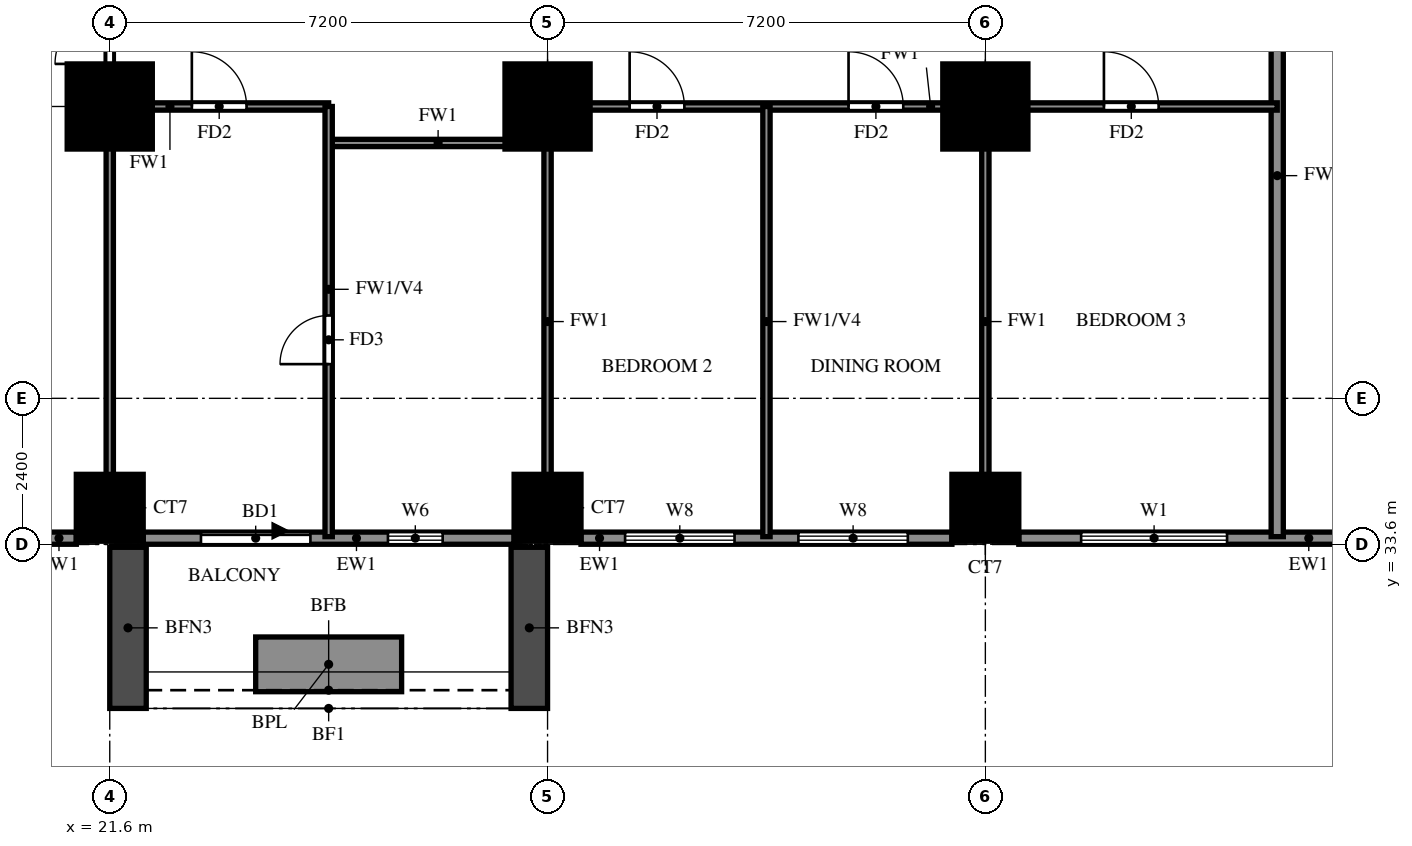
"""IFC4 building model, lengths in metres.
Left out: names, types, materials, properties, quantities, classifications, styles, units other than length and angle.
Written with IfcOpenShell. Run it as: python <this file> out.ifc"""

import sys

from ifc_helpers import new_model, si_unit, direction, frame, frame_2d, origin, origin_2d, place, context, subcontext, project, spatial, rectangle, extrude, source, transform, mapped, element, fill, save


model = new_model("IFC4")
c1 = context("Model", 3, precision=1e-05, world=origin(), true_north=direction((0.0, 1.0)))
c2 = subcontext(c1, "Body", "Model", "MODEL_VIEW")
j1 = project(units=[si_unit("LENGTHUNIT", "METRE"), si_unit("PLANEANGLEUNIT", "RADIAN")], contexts=[c1])
p1 = place(None, origin())
s1 = spatial("IfcSite", under=j1, at=p1, CompositionType="ELEMENT")
p2 = place(p1, origin())
s2 = spatial("IfcBuilding", under=s1, at=p2, CompositionType="ELEMENT")
p3 = place(p2, frame((0.0, 0.0, 44.5)))
s3 = spatial("IfcBuildingStorey", under=s2, at=p3, CompositionType="ELEMENT", Elevation=44.5)
m1 = source(origin(), c2, "Body", "SweptSolid", [
    extrude(rectangle(XDim=1.1, YDim=1.1, at=origin_2d()), origin(), (0.0, 0.0, 1.0), 3.18),
])
for number, where, z_axis, x_axis in (
    (1, (21.6, 34.2, 0.0), (0.0, 0.0, 1.0), (1.0, 0.0, 0.0)),
    (2, (28.8, 34.2, 0.0), (0.0, 0.0, 1.0), (1.0, 0.0, 0.0)),
    (3, (36.0, 34.2, 0.0), (0.0, 0.0, 1.0), (1.0, 0.0, 0.0)),
):
    element("IfcColumn", number, at=place(p3, frame(where, z_axis=z_axis, x_axis=x_axis)), inside=s3, PredefinedType="COLUMN", context=c2, shape_type="MappedRepresentation", body=[
        mapped(m1, transform((0.0, 0.0, 0.0))),
    ])
m2 = source(origin(), c2, "Body", "SweptSolid", [
    extrude(rectangle(XDim=1.4, YDim=1.4, at=origin_2d()), origin(), (0.0, 0.0, 1.0), 3.18),
])
for number, where, z_axis, x_axis in (
    (4, (21.6, 40.8, 0.0), (0.0, 0.0, 1.0), (1.0, 0.0, 0.0)),
    (5, (28.8, 40.8, 0.0), (0.0, 0.0, 1.0), (1.0, 0.0, 0.0)),
    (6, (36.0, 40.8, 0.0), (0.0, 0.0, 1.0), (1.0, 0.0, 0.0)),
):
    element("IfcColumn", number, at=place(p3, frame(where, z_axis=z_axis, x_axis=x_axis)), inside=s3, PredefinedType="COLUMN", context=c2, shape_type="MappedRepresentation", body=[
        mapped(m2, transform((0.0, 0.0, 0.0))),
    ])
p4 = place(p3, frame((18.2, 33.7, 0.0), z_axis=(0.0, 0.0, 1.0), x_axis=(1.0, 0.0, 0.0)))
e7 = element("IfcWall", 7, at=p4, inside=s3, PredefinedType="SOLIDWALL", context=c2, shape_type="SweptSolid", body=[
    extrude(rectangle(XDim=2.85, YDim=0.2, at=frame_2d((1.425, 0.0))), origin(), (0.0, 0.0, 1.0), 3.18),
])
p5 = place(p4, frame((0.525, 0.0, 0.6)))
e8 = element("IfcOpeningElement", 8, at=p5, cuts=e7, PredefinedType="OPENING", context=c2, shape_type="SweptSolid", body=[
    extrude(rectangle(XDim=1.8, YDim=2.4, at=frame_2d((0.9, 1.2))), frame((0.0, 0.11, 0.0), z_axis=(0.0, -1.0, 0.0), x_axis=(1.0, 0.0, 0.0)), (0.0, 0.0, 1.0), 0.22),
])
p6 = place(p3, frame((22.15, 33.7, 0.0), z_axis=(0.0, 0.0, 1.0), x_axis=(1.0, 0.0, 0.0)))
e9 = element("IfcWall", 9, at=p6, inside=s3, PredefinedType="SOLIDWALL", context=c2, shape_type="SweptSolid", body=[
    extrude(rectangle(XDim=6.1, YDim=0.2, at=frame_2d((3.05, 0.0))), origin(), (0.0, 0.0, 1.0), 3.18),
])
p7 = place(p6, frame((0.95, 0.0, 0.0)))
e10 = element("IfcOpeningElement", 10, at=p7, cuts=e9, PredefinedType="OPENING", context=c2, shape_type="SweptSolid", body=[
    extrude(rectangle(XDim=1.8, YDim=2.4, at=frame_2d((0.9, 1.2))), frame((0.0, 0.11, 0.0), z_axis=(0.0, -1.0, 0.0), x_axis=(1.0, 0.0, 0.0)), (0.0, 0.0, 1.0), 0.22),
])
p8 = place(p6, frame((4.025, 0.0, 1.5)))
e11 = element("IfcOpeningElement", 11, at=p8, cuts=e9, PredefinedType="OPENING", context=c2, shape_type="SweptSolid", body=[
    extrude(rectangle(XDim=0.9, YDim=0.9, at=frame_2d((0.45, 0.45))), frame((0.0, 0.11, 0.0), z_axis=(0.0, -1.0, 0.0), x_axis=(1.0, 0.0, 0.0)), (0.0, 0.0, 1.0), 0.22),
])
p9 = place(p3, frame((29.35, 33.7, 0.0), z_axis=(0.0, 0.0, 1.0), x_axis=(1.0, 0.0, 0.0)))
e12 = element("IfcWall", 12, at=p9, inside=s3, PredefinedType="SOLIDWALL", context=c2, shape_type="SweptSolid", body=[
    extrude(rectangle(XDim=6.1, YDim=0.2, at=frame_2d((3.05, 0.0))), origin(), (0.0, 0.0, 1.0), 3.18),
])
p10 = place(p9, frame((0.725, 0.0, 0.6)))
e13 = element("IfcOpeningElement", 13, at=p10, cuts=e12, PredefinedType="OPENING", context=c2, shape_type="SweptSolid", body=[
    extrude(rectangle(XDim=1.8, YDim=2.4, at=frame_2d((0.9, 1.2))), frame((0.0, 0.11, 0.0), z_axis=(0.0, -1.0, 0.0), x_axis=(1.0, 0.0, 0.0)), (0.0, 0.0, 1.0), 0.22),
])
p11 = place(p9, frame((3.575, 0.0, 0.6)))
e14 = element("IfcOpeningElement", 14, at=p11, cuts=e12, PredefinedType="OPENING", context=c2, shape_type="SweptSolid", body=[
    extrude(rectangle(XDim=1.8, YDim=2.4, at=frame_2d((0.9, 1.2))), frame((0.0, 0.11, 0.0), z_axis=(0.0, -1.0, 0.0), x_axis=(1.0, 0.0, 0.0)), (0.0, 0.0, 1.0), 0.22),
])
p12 = place(p3, frame((36.55, 33.7, 0.0), z_axis=(0.0, 0.0, 1.0), x_axis=(1.0, 0.0, 0.0)))
e15 = element("IfcWall", 15, at=p12, inside=s3, PredefinedType="SOLIDWALL", context=c2, shape_type="SweptSolid", body=[
    extrude(rectangle(XDim=5.45, YDim=0.2, at=frame_2d((2.725, 0.0))), origin(), (0.0, 0.0, 1.0), 3.18),
])
p13 = place(p12, frame((1.025, 0.0, 0.6)))
e16 = element("IfcOpeningElement", 16, at=p13, cuts=e15, PredefinedType="OPENING", context=c2, shape_type="SweptSolid", body=[
    extrude(rectangle(XDim=2.4, YDim=2.4, at=frame_2d((1.2, 1.2))), frame((0.0, 0.11, 0.0), z_axis=(0.0, -1.0, 0.0), x_axis=(1.0, 0.0, 0.0)), (0.0, 0.0, 1.0), 0.22),
])
for number, where, z_axis, x_axis in (
    (17, (21.9, 33.55, 0.0), (0.0, 0.0, 1.0), (0.0, -1.0, 0.0)),
    (18, (28.5, 33.55, 0.0), (0.0, 0.0, 1.0), (0.0, -1.0, 0.0)),
):
    element("IfcWall", number, at=place(p3, frame(where, z_axis=z_axis, x_axis=x_axis)), inside=s3, PredefinedType="SOLIDWALL", context=c2, shape_type="SweptSolid", body=[
        extrude(rectangle(XDim=2.65, YDim=0.6, at=frame_2d((1.325, 0.0))), origin(), (0.0, 0.0, 1.0), 2.85),
    ])
p14 = place(p3, frame((24.0, 31.625, 0.0), z_axis=(0.0, 0.0, 1.0), x_axis=(1.0, 0.0, 0.0)))
e19 = element("IfcWall", 19, at=p14, inside=s3, PredefinedType="SOLIDWALL", context=c2, shape_type="SweptSolid", body=[
    extrude(rectangle(XDim=2.4, YDim=0.9, at=frame_2d((1.2, 0.0))), origin(), (0.0, 0.0, 1.0), 0.9),
])
p15 = place(p3, frame((40.8, 33.725, 0.0), z_axis=(0.0, 0.0, 1.0), x_axis=(0.0, 1.0, 0.0)))
e20 = element("IfcWall", 20, at=p15, inside=s3, PredefinedType="SOLIDWALL", context=c2, shape_type="SweptSolid", body=[
    extrude(rectangle(XDim=11.875, YDim=0.2, at=frame_2d((5.938, 0.0))), origin(), (0.0, 0.0, 1.0), 2.28),
])
p16 = place(p3, frame((25.2, 40.2, 0.0), z_axis=(0.0, 0.0, 1.0), x_axis=(1.0, 0.0, 0.0)))
e21 = element("IfcWall", 21, at=p16, inside=s3, PredefinedType="PARTITIONING", context=c2, shape_type="SweptSolid", body=[
    extrude(rectangle(XDim=3.6, YDim=0.12, at=frame_2d((1.8, 0.0))), origin(), (0.0, 0.0, 1.0), 3.18),
])
p17 = place(p3, frame((21.6, 40.8, 0.0), z_axis=(0.0, 0.0, 1.0), x_axis=(1.0, 0.0, 0.0)))
e22 = element("IfcWall", 22, at=p17, inside=s3, PredefinedType="PARTITIONING", context=c2, shape_type="SweptSolid", body=[
    extrude(rectangle(XDim=3.6, YDim=0.12, at=frame_2d((1.8, 0.0))), origin(), (0.0, 0.0, 1.0), 3.18),
])
p18 = place(p17, frame((1.35, 0.0, 0.0)))
e23 = element("IfcOpeningElement", 23, at=p18, cuts=e22, PredefinedType="OPENING", context=c2, shape_type="SweptSolid", body=[
    extrude(rectangle(XDim=0.9, YDim=2.1, at=frame_2d((0.45, 1.05))), frame((0.0, 0.07, 0.0), z_axis=(0.0, -1.0, 0.0), x_axis=(1.0, 0.0, 0.0)), (0.0, 0.0, 1.0), 0.14),
])
p19 = place(p3, frame((28.8, 40.8, 0.0), z_axis=(0.0, 0.0, 1.0), x_axis=(1.0, 0.0, 0.0)))
e24 = element("IfcWall", 24, at=p19, inside=s3, PredefinedType="PARTITIONING", context=c2, shape_type="SweptSolid", body=[
    extrude(rectangle(XDim=12.0, YDim=0.12, at=frame_2d((6.0, 0.0))), origin(), (0.0, 0.0, 1.0), 3.18),
])
p20 = place(p19, frame((1.35, 0.0, 0.0)))
e25 = element("IfcOpeningElement", 25, at=p20, cuts=e24, PredefinedType="OPENING", context=c2, shape_type="SweptSolid", body=[
    extrude(rectangle(XDim=0.9, YDim=2.1, at=frame_2d((0.45, 1.05))), frame((0.0, 0.07, 0.0), z_axis=(0.0, -1.0, 0.0), x_axis=(1.0, 0.0, 0.0)), (0.0, 0.0, 1.0), 0.14),
])
p21 = place(p19, frame((4.95, 0.0, 0.0)))
e26 = element("IfcOpeningElement", 26, at=p21, cuts=e24, PredefinedType="OPENING", context=c2, shape_type="SweptSolid", body=[
    extrude(rectangle(XDim=0.9, YDim=2.1, at=frame_2d((0.45, 1.05))), frame((0.0, 0.07, 0.0), z_axis=(0.0, -1.0, 0.0), x_axis=(1.0, 0.0, 0.0)), (0.0, 0.0, 1.0), 0.14),
])
p22 = place(p19, frame((9.15, 0.0, 0.0)))
e27 = element("IfcOpeningElement", 27, at=p22, cuts=e24, PredefinedType="OPENING", context=c2, shape_type="SweptSolid", body=[
    extrude(rectangle(XDim=0.9, YDim=2.1, at=frame_2d((0.45, 1.05))), frame((0.0, 0.07, 0.0), z_axis=(0.0, -1.0, 0.0), x_axis=(1.0, 0.0, 0.0)), (0.0, 0.0, 1.0), 0.14),
])
p23 = place(p3, frame((21.6, 33.725, 0.0), z_axis=(0.0, 0.0, 1.0), x_axis=(0.0, 1.0, 0.0)))
e28 = element("IfcWall", 28, at=p23, inside=s3, PredefinedType="PARTITIONING", context=c2, shape_type="SweptSolid", body=[
    extrude(rectangle(XDim=35.875, YDim=0.12, at=frame_2d((17.938, 0.0))), origin(), (0.0, 0.0, 1.0), 3.18),
])
p24 = place(p23, frame((7.775, 0.0, 0.0)))
e29 = element("IfcOpeningElement", 29, at=p24, cuts=e28, PredefinedType="OPENING", context=c2, shape_type="SweptSolid", body=[
    extrude(rectangle(XDim=0.9, YDim=2.1, at=frame_2d((0.45, 1.05))), frame((0.0, 0.07, 0.0), z_axis=(0.0, -1.0, 0.0), x_axis=(1.0, 0.0, 0.0)), (0.0, 0.0, 1.0), 0.14),
])
p25 = place(p23, frame((15.625, 0.0, 0.0)))
e30 = element("IfcOpeningElement", 30, at=p25, cuts=e28, PredefinedType="OPENING", context=c2, shape_type="SweptSolid", body=[
    extrude(rectangle(XDim=0.9, YDim=2.1, at=frame_2d((0.45, 1.05))), frame((0.0, 0.07, 0.0), z_axis=(0.0, -1.0, 0.0), x_axis=(1.0, 0.0, 0.0)), (0.0, 0.0, 1.0), 0.14),
])
p26 = place(p23, frame((22.225, 0.0, 0.0)))
e31 = element("IfcOpeningElement", 31, at=p26, cuts=e28, PredefinedType="OPENING", context=c2, shape_type="SweptSolid", body=[
    extrude(rectangle(XDim=1.5, YDim=2.1, at=frame_2d((0.75, 1.05))), frame((0.0, 0.07, 0.0), z_axis=(0.0, -1.0, 0.0), x_axis=(1.0, 0.0, 0.0)), (0.0, 0.0, 1.0), 0.14),
])
p27 = place(p23, frame((26.425, 0.0, 0.0)))
e32 = element("IfcOpeningElement", 32, at=p27, cuts=e28, PredefinedType="OPENING", context=c2, shape_type="SweptSolid", body=[
    extrude(rectangle(XDim=0.9, YDim=2.1, at=frame_2d((0.45, 1.05))), frame((0.0, 0.07, 0.0), z_axis=(0.0, -1.0, 0.0), x_axis=(1.0, 0.0, 0.0)), (0.0, 0.0, 1.0), 0.14),
])
p28 = place(p23, frame((31.825, 0.0, 0.0)))
e33 = element("IfcOpeningElement", 33, at=p28, cuts=e28, PredefinedType="OPENING", context=c2, shape_type="SweptSolid", body=[
    extrude(rectangle(XDim=0.9, YDim=2.1, at=frame_2d((0.45, 1.05))), frame((0.0, 0.07, 0.0), z_axis=(0.0, -1.0, 0.0), x_axis=(1.0, 0.0, 0.0)), (0.0, 0.0, 1.0), 0.14),
])
p29 = place(p3, frame((25.2, 33.725, 0.0), z_axis=(0.0, 0.0, 1.0), x_axis=(0.0, 1.0, 0.0)))
e34 = element("IfcWall", 34, at=p29, inside=s3, PredefinedType="PARTITIONING", context=c2, shape_type="SweptSolid", body=[
    extrude(rectangle(XDim=7.075, YDim=0.12, at=frame_2d((3.538, 0.0))), origin(), (0.0, 0.0, 1.0), 2.28),
])
p30 = place(p29, frame((2.837, 0.0, 0.0)))
e35 = element("IfcOpeningElement", 35, at=p30, cuts=e34, PredefinedType="OPENING", context=c2, shape_type="SweptSolid", body=[
    extrude(rectangle(XDim=0.8, YDim=2.1, at=frame_2d((0.4, 1.05))), frame((0.0, 0.07, 0.0), z_axis=(0.0, -1.0, 0.0), x_axis=(1.0, 0.0, 0.0)), (0.0, 0.0, 1.0), 0.14),
])
p31 = place(p3, frame((28.8, 33.725, 0.0), z_axis=(0.0, 0.0, 1.0), x_axis=(0.0, 1.0, 0.0)))
e36 = element("IfcWall", 36, at=p31, inside=s3, PredefinedType="PARTITIONING", context=c2, shape_type="SweptSolid", body=[
    extrude(rectangle(XDim=7.075, YDim=0.12, at=frame_2d((3.538, 0.0))), origin(), (0.0, 0.0, 1.0), 3.18),
])
p32 = place(p3, frame((32.4, 33.725, 0.0), z_axis=(0.0, 0.0, 1.0), x_axis=(0.0, 1.0, 0.0)))
e37 = element("IfcWall", 37, at=p32, inside=s3, PredefinedType="PARTITIONING", context=c2, shape_type="SweptSolid", body=[
    extrude(rectangle(XDim=7.075, YDim=0.12, at=frame_2d((3.538, 0.0))), origin(), (0.0, 0.0, 1.0), 2.28),
])
p33 = place(p3, frame((36.0, 33.725, 0.0), z_axis=(0.0, 0.0, 1.0), x_axis=(0.0, 1.0, 0.0)))
e38 = element("IfcWall", 38, at=p33, inside=s3, PredefinedType="PARTITIONING", context=c2, shape_type="SweptSolid", body=[
    extrude(rectangle(XDim=7.075, YDim=0.12, at=frame_2d((3.538, 0.0))), origin(), (0.0, 0.0, 1.0), 3.18),
])
p34 = place(p7, origin())
e39 = element("IfcDoor", 39, at=p34, inside=s3, OperationType="DOUBLE_DOOR_SLIDING", PredefinedType="DOOR", context=c2, shape_type="SweptSolid", body=[
    extrude(rectangle(XDim=1.8, YDim=2.4, at=frame_2d((0.9, 1.2))), frame((0.0, 0.025, 0.0), z_axis=(0.0, -1.0, 0.0), x_axis=(1.0, 0.0, 0.0)), (0.0, 0.0, 1.0), 0.05),
])
fill(e10, e39)
p35 = place(p8, origin())
e40 = element("IfcWindow", 40, at=p35, inside=s3, PartitioningType="SINGLE_PANEL", PredefinedType="WINDOW", context=c2, shape_type="SweptSolid", body=[
    extrude(rectangle(XDim=0.9, YDim=0.9, at=frame_2d((0.45, 0.45))), frame((0.0, 0.03, 0.0), z_axis=(0.0, -1.0, 0.0), x_axis=(1.0, 0.0, 0.0)), (0.0, 0.0, 1.0), 0.06),
])
fill(e11, e40)
p36 = place(p10, origin())
e41 = element("IfcWindow", 41, at=p36, inside=s3, PartitioningType="DOUBLE_PANEL_VERTICAL", PredefinedType="WINDOW", context=c2, shape_type="SweptSolid", body=[
    extrude(rectangle(XDim=1.8, YDim=2.4, at=frame_2d((0.9, 1.2))), frame((0.0, 0.03, 0.0), z_axis=(0.0, -1.0, 0.0), x_axis=(1.0, 0.0, 0.0)), (0.0, 0.0, 1.0), 0.06),
])
fill(e13, e41)
p37 = place(p11, origin())
e42 = element("IfcWindow", 42, at=p37, inside=s3, PartitioningType="DOUBLE_PANEL_VERTICAL", PredefinedType="WINDOW", context=c2, shape_type="SweptSolid", body=[
    extrude(rectangle(XDim=1.8, YDim=2.4, at=frame_2d((0.9, 1.2))), frame((0.0, 0.03, 0.0), z_axis=(0.0, -1.0, 0.0), x_axis=(1.0, 0.0, 0.0)), (0.0, 0.0, 1.0), 0.06),
])
fill(e14, e42)
p38 = place(p13, origin())
e43 = element("IfcWindow", 43, at=p38, inside=s3, PartitioningType="DOUBLE_PANEL_VERTICAL", PredefinedType="WINDOW", context=c2, shape_type="SweptSolid", body=[
    extrude(rectangle(XDim=2.4, YDim=2.4, at=frame_2d((1.2, 1.2))), frame((0.0, 0.03, 0.0), z_axis=(0.0, -1.0, 0.0), x_axis=(1.0, 0.0, 0.0)), (0.0, 0.0, 1.0), 0.06),
])
fill(e16, e43)
p39 = place(p24, origin())
e44 = element("IfcDoor", 44, at=p39, inside=s3, OperationType="SINGLE_SWING_RIGHT", PredefinedType="DOOR", context=c2, shape_type="SweptSolid", body=[
    extrude(rectangle(XDim=0.9, YDim=2.1, at=frame_2d((0.45, 1.05))), frame((0.0, 0.025, 0.0), z_axis=(0.0, -1.0, 0.0), x_axis=(1.0, 0.0, 0.0)), (0.0, 0.0, 1.0), 0.05),
])
fill(e29, e44)
p40 = place(p18, origin())
e45 = element("IfcDoor", 45, at=p40, inside=s3, OperationType="SINGLE_SWING_RIGHT", PredefinedType="DOOR", context=c2, shape_type="SweptSolid", body=[
    extrude(rectangle(XDim=0.9, YDim=2.1, at=frame_2d((0.45, 1.05))), frame((0.0, 0.025, 0.0), z_axis=(0.0, -1.0, 0.0), x_axis=(1.0, 0.0, 0.0)), (0.0, 0.0, 1.0), 0.05),
])
fill(e23, e45)
p41 = place(p30, origin())
e46 = element("IfcDoor", 46, at=p41, inside=s3, OperationType="SINGLE_SWING_LEFT", PredefinedType="DOOR", context=c2, shape_type="SweptSolid", body=[
    extrude(rectangle(XDim=0.8, YDim=2.1, at=frame_2d((0.4, 1.05))), frame((0.0, 0.025, 0.0), z_axis=(0.0, -1.0, 0.0), x_axis=(1.0, 0.0, 0.0)), (0.0, 0.0, 1.0), 0.05),
])
fill(e35, e46)
p42 = place(p20, origin())
e47 = element("IfcDoor", 47, at=p42, inside=s3, OperationType="SINGLE_SWING_LEFT", PredefinedType="DOOR", context=c2, shape_type="SweptSolid", body=[
    extrude(rectangle(XDim=0.9, YDim=2.1, at=frame_2d((0.45, 1.05))), frame((0.0, 0.025, 0.0), z_axis=(0.0, -1.0, 0.0), x_axis=(1.0, 0.0, 0.0)), (0.0, 0.0, 1.0), 0.05),
])
fill(e25, e47)
p43 = place(p21, origin())
e48 = element("IfcDoor", 48, at=p43, inside=s3, OperationType="SINGLE_SWING_RIGHT", PredefinedType="DOOR", context=c2, shape_type="SweptSolid", body=[
    extrude(rectangle(XDim=0.9, YDim=2.1, at=frame_2d((0.45, 1.05))), frame((0.0, 0.025, 0.0), z_axis=(0.0, -1.0, 0.0), x_axis=(1.0, 0.0, 0.0)), (0.0, 0.0, 1.0), 0.05),
])
fill(e26, e48)
p44 = place(p22, origin())
e49 = element("IfcDoor", 49, at=p44, inside=s3, OperationType="SINGLE_SWING_LEFT", PredefinedType="DOOR", context=c2, shape_type="SweptSolid", body=[
    extrude(rectangle(XDim=0.9, YDim=2.1, at=frame_2d((0.45, 1.05))), frame((0.0, 0.025, 0.0), z_axis=(0.0, -1.0, 0.0), x_axis=(1.0, 0.0, 0.0)), (0.0, 0.0, 1.0), 0.05),
])
fill(e27, e49)
save(model, sys.argv[1])
